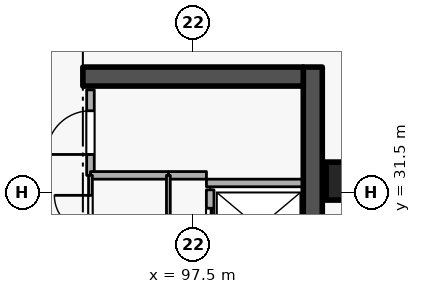
"""IFC4 building model, lengths in metres.
Left out: names, types, materials, properties, quantities, classifications, styles, units other than length and angle.
Written with IfcOpenShell. Run it as: python <this file> out.ifc"""

import sys

from ifc_helpers import new_model, si_unit, direction, frame, frame_2d, origin, origin_2d, place, context, subcontext, project, spatial, rectangle, extrude, element, fill, save


model = new_model("IFC4")
c1 = context("Model", 3, precision=1e-05, world=origin(), true_north=direction((0.0, 1.0)))
c2 = subcontext(c1, "Body", "Model", "MODEL_VIEW")
j1 = project(units=[si_unit("LENGTHUNIT", "METRE"), si_unit("PLANEANGLEUNIT", "RADIAN")], contexts=[c1])
p1 = place(None, origin())
s1 = spatial("IfcSite", under=j1, at=p1, CompositionType="ELEMENT")
p2 = place(p1, origin())
s2 = spatial("IfcBuilding", under=s1, at=p2, CompositionType="ELEMENT")
p3 = place(p2, frame((0.0, 0.0, 221.7)))
s3 = spatial("IfcBuildingStorey", under=s2, at=p3, CompositionType="ELEMENT", Elevation=221.7)
p4 = place(p3, frame((100.65, 19.2, 0.0), z_axis=(0.0, 0.0, 1.0), x_axis=(0.0, 1.0, 0.0)))
e1 = element("IfcWall", 1, at=p4, inside=s3, PredefinedType="SHEAR", context=c2, shape_type="SweptSolid", body=[
    extrude(rectangle(XDim=15.6, YDim=0.5, at=frame_2d((7.8, 0.0))), origin(), (0.0, 0.0, 1.0), 4.2),
])
p5 = place(p3, frame((94.6, 34.55, 0.0), z_axis=(0.0, 0.0, 1.0), x_axis=(1.0, 0.0, 0.0)))
e2 = element("IfcWall", 2, at=p5, inside=s3, PredefinedType="SHEAR", context=c2, shape_type="SweptSolid", body=[
    extrude(rectangle(XDim=5.8, YDim=0.5, at=frame_2d((2.9, 0.0))), origin(), (0.0, 0.0, 1.0), 4.2),
])
p6 = place(p3, frame((101.5, 31.8, 0.0), z_axis=(0.0, 0.0, 1.0), x_axis=(1.0, 0.0, 0.0)))
e3 = element("IfcColumn", 3, at=p6, inside=s3, PredefinedType="COLUMN", context=c2, shape_type="SweptSolid", body=[
    extrude(rectangle(XDim=1.0, YDim=1.0, at=origin_2d()), origin(), (0.0, 0.0, 1.0), 4.2),
])
p7 = place(p3, frame((97.95, 31.57, 0.0), z_axis=(0.0, 0.0, 1.0), x_axis=(0.0, -1.0, 0.0)))
e4 = element("IfcWall", 4, at=p7, inside=s3, PredefinedType="STANDARD", context=c2, shape_type="SweptSolid", body=[
    extrude(rectangle(XDim=1.99, YDim=0.2, at=frame_2d((0.995, 0.0))), origin(), (0.0, 0.0, 1.0), 3.94),
])
p8 = place(p7, frame((0.485, 0.0, 0.0)))
e5 = element("IfcOpeningElement", 5, at=p8, cuts=e4, PredefinedType="OPENING", context=c2, shape_type="SweptSolid", body=[
    extrude(rectangle(XDim=1.02, YDim=2.06, at=frame_2d((0.51, 1.03))), frame((0.0, 0.11, 0.0), z_axis=(0.0, -1.0, 0.0), x_axis=(1.0, 0.0, 0.0)), (0.0, 0.0, 1.0), 0.22),
])
p9 = place(p3, frame((97.852, 31.75, 0.0), z_axis=(0.0, 0.0, 1.0), x_axis=(1.0, 0.0, 0.0)))
e6 = element("IfcWall", 6, at=p9, inside=s3, PredefinedType="STANDARD", context=c2, shape_type="SweptSolid", body=[
    extrude(rectangle(XDim=2.536, YDim=0.2, at=frame_2d((1.268, 0.0))), origin(), (0.0, 0.0, 1.0), 3.94),
])
p10 = place(p3, frame((94.8, 31.95, 0.0), z_axis=(0.0, 0.0, 1.0), x_axis=(0.0, 1.0, 0.0)))
e7 = element("IfcWall", 7, at=p10, inside=s3, PredefinedType="STANDARD", context=c2, shape_type="SweptSolid", body=[
    extrude(rectangle(XDim=2.25, YDim=0.2, at=frame_2d((1.125, 0.0))), origin(), (0.0, 0.0, 1.0), 3.94),
])
p11 = place(p10, frame((0.55, 0.0, 0.0)))
e8 = element("IfcOpeningElement", 8, at=p11, cuts=e7, PredefinedType="OPENING", context=c2, shape_type="SweptSolid", body=[
    extrude(rectangle(XDim=1.15, YDim=2.1, at=frame_2d((0.575, 1.05))), frame((0.0, 0.11, 0.0), z_axis=(0.0, -1.0, 0.0), x_axis=(1.0, 0.0, 0.0)), (0.0, 0.0, 1.0), 0.22),
])
p12 = place(p3, frame((97.852, 31.95, 0.0), z_axis=(0.0, 0.0, 1.0), x_axis=(-1.0, 0.0, 0.0)))
e9 = element("IfcWall", 9, at=p12, inside=s3, PredefinedType="STANDARD", context=c2, shape_type="SweptSolid", body=[
    extrude(rectangle(XDim=1.002, YDim=0.2, at=frame_2d((0.501, 0.0))), origin(), (0.0, 0.0, 1.0), 3.94),
])
p13 = place(p3, frame((96.85, 31.95, 0.0), z_axis=(0.0, 0.0, 1.0), x_axis=(-1.0, 0.0, 0.0)))
e10 = element("IfcWall", 10, at=p13, inside=s3, PredefinedType="STANDARD", context=c2, shape_type="SweptSolid", body=[
    extrude(rectangle(XDim=2.05, YDim=0.2, at=frame_2d((1.025, 0.0))), origin(), (0.0, 0.0, 1.0), 3.94),
])
p14 = place(p3, frame((94.8, 29.95, 0.0), z_axis=(0.0, 0.0, 1.0), x_axis=(0.0, 1.0, 0.0)))
e11 = element("IfcWall", 11, at=p14, inside=s3, PredefinedType="PARTITIONING", context=c2, shape_type="SweptSolid", body=[
    extrude(rectangle(XDim=2.0, YDim=0.1, at=frame_2d((1.0, 0.0))), origin(), (0.0, 0.0, 1.0), 3.94),
])
p15 = place(p14, frame((0.525, 0.0, 0.0)))
e12 = element("IfcOpeningElement", 12, at=p15, cuts=e11, PredefinedType="OPENING", context=c2, shape_type="SweptSolid", body=[
    extrude(rectangle(XDim=0.95, YDim=2.1, at=frame_2d((0.475, 1.05))), frame((0.0, 0.06, 0.0), z_axis=(0.0, -1.0, 0.0), x_axis=(1.0, 0.0, 0.0)), (0.0, 0.0, 1.0), 0.12),
])
p16 = place(p3, frame((96.85, 31.95, 0.0), z_axis=(0.0, 0.0, 1.0), x_axis=(0.0, -1.0, 0.0)))
e13 = element("IfcWall", 13, at=p16, inside=s3, PredefinedType="PARTITIONING", context=c2, shape_type="SweptSolid", body=[
    extrude(rectangle(XDim=2.0, YDim=0.1, at=frame_2d((1.0, 0.0))), origin(), (0.0, 0.0, 1.0), 3.94),
])
p17 = place(p8, origin())
e14 = element("IfcDoor", 14, at=p17, inside=s3, OperationType="SLIDING_TO_LEFT", PredefinedType="DOOR", context=c2, shape_type="SweptSolid", body=[
    extrude(rectangle(XDim=1.02, YDim=2.06, at=frame_2d((0.51, 1.03))), frame((0.0, 0.025, 0.0), z_axis=(0.0, -1.0, 0.0), x_axis=(1.0, 0.0, 0.0)), (0.0, 0.0, 1.0), 0.05),
])
fill(e5, e14)
p18 = place(p15, origin())
e15 = element("IfcDoor", 15, at=p18, inside=s3, OperationType="SINGLE_SWING_RIGHT", PredefinedType="DOOR", context=c2, shape_type="SweptSolid", body=[
    extrude(rectangle(XDim=0.95, YDim=2.1, at=frame_2d((0.475, 1.05))), frame((0.0, 0.025, 0.0), z_axis=(0.0, -1.0, 0.0), x_axis=(1.0, 0.0, 0.0)), (0.0, 0.0, 1.0), 0.05),
])
fill(e12, e15)
p19 = place(p11, origin())
e16 = element("IfcDoor", 16, at=p19, inside=s3, OperationType="SINGLE_SWING_LEFT", PredefinedType="DOOR", context=c2, shape_type="SweptSolid", body=[
    extrude(rectangle(XDim=1.15, YDim=2.1, at=frame_2d((0.575, 1.05))), frame((0.0, 0.025, 0.0), z_axis=(0.0, -1.0, 0.0), x_axis=(1.0, 0.0, 0.0)), (0.0, 0.0, 1.0), 0.05),
])
fill(e8, e16)
save(model, sys.argv[1])
